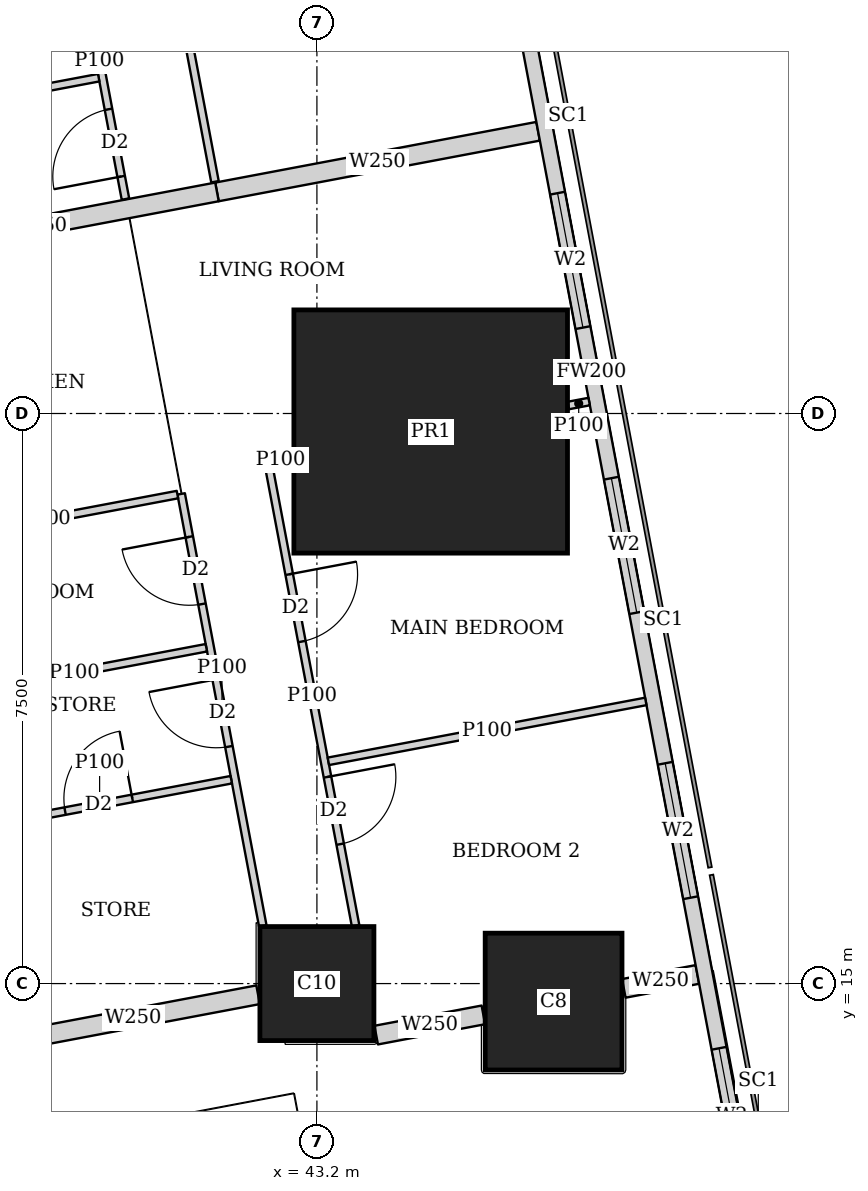
"""IFC4 building model, lengths in metres.
Left out: names, types, materials, properties, quantities, classifications, styles, units other than length and angle.
Written with IfcOpenShell. Run it as: python <this file> out.ifc"""

import sys

from ifc_helpers import new_model, si_unit, direction, frame, frame_2d, origin, origin_2d, place, context, subcontext, project, spatial, rectangle, extrude, element, fill, save


model = new_model("IFC4")
c1 = context("Model", 3, precision=1e-05, world=origin(), true_north=direction((0.0, 1.0)))
c2 = subcontext(c1, "Body", "Model", "MODEL_VIEW")
j1 = project(units=[si_unit("LENGTHUNIT", "METRE"), si_unit("PLANEANGLEUNIT", "RADIAN")], contexts=[c1])
p1 = place(None, origin())
s1 = spatial("IfcSite", under=j1, at=p1, CompositionType="ELEMENT")
p2 = place(p1, origin())
s2 = spatial("IfcBuilding", under=s1, at=p2, CompositionType="ELEMENT")
p3 = place(p2, frame((0.0, 0.0, 184.55)))
s3 = spatial("IfcBuildingStorey", under=s2, at=p3, CompositionType="ELEMENT", Elevation=184.55)
p4 = place(p3, frame((43.2, 15.0, 0.0), z_axis=(0.0, 0.0, 1.0), x_axis=(1.0, 0.0, 0.0)))
e1 = element("IfcColumn", 1, at=p4, inside=s3, PredefinedType="COLUMN", context=c2, shape_type="SweptSolid", body=[
    extrude(rectangle(XDim=1.5, YDim=1.5, at=origin_2d()), origin(), (0.0, 0.0, 1.0), 3.75),
])
p5 = place(p3, frame((46.314, 14.763, 0.0), z_axis=(0.0, 0.0, 1.0), x_axis=(1.0, 0.0, 0.0)))
e2 = element("IfcColumn", 2, at=p5, inside=s3, PredefinedType="COLUMN", context=c2, shape_type="SweptSolid", body=[
    extrude(rectangle(XDim=1.8, YDim=1.8, at=origin_2d()), origin(), (0.0, 0.0, 1.0), 3.75),
])
p6 = place(p3, frame((44.697, 22.263, 0.0), z_axis=(0.0, 0.0, 1.0), x_axis=(1.0, 0.0, 0.0)))
e3 = element("IfcColumn", 3, at=p6, inside=s3, PredefinedType="COLUMN", context=c2, shape_type="SweptSolid", body=[
    extrude(rectangle(XDim=3.6, YDim=3.2, at=origin_2d()), origin(), (0.0, 0.0, 1.0), 3.75),
])
p7 = place(p3, frame((50.653, 2.703, 0.0), z_axis=(0.0, 0.0, 1.0), x_axis=(-0.185612026696, 0.982623109613, 0.0)))
e4 = element("IfcWall", 4, at=p7, inside=s3, PredefinedType="SOLIDWALL", context=c2, shape_type="SweptSolid", body=[
    extrude(rectangle(XDim=41.393, YDim=0.2, at=frame_2d((20.697, 0.0))), origin(), (0.0, 0.0, 1.0), 3.45),
])
p8 = place(p7, frame((1.633, 0.0, 0.9)))
e5 = element("IfcOpeningElement", 5, at=p8, cuts=e4, PredefinedType="OPENING", context=c2, shape_type="SweptSolid", body=[
    extrude(rectangle(XDim=1.8, YDim=1.5, at=frame_2d((0.9, 0.75))), frame((0.0, 0.11, 0.0), z_axis=(0.0, -1.0, 0.0), x_axis=(1.0, 0.0, 0.0)), (0.0, 0.0, 1.0), 0.22),
])
p9 = place(p7, frame((6.032, 0.0, 0.9)))
e6 = element("IfcOpeningElement", 6, at=p9, cuts=e4, PredefinedType="OPENING", context=c2, shape_type="SweptSolid", body=[
    extrude(rectangle(XDim=1.8, YDim=1.5, at=frame_2d((0.9, 0.75))), frame((0.0, 0.11, 0.0), z_axis=(0.0, -1.0, 0.0), x_axis=(1.0, 0.0, 0.0)), (0.0, 0.0, 1.0), 0.22),
])
p10 = place(p7, frame((9.848, 0.0, 0.9)))
e7 = element("IfcOpeningElement", 7, at=p10, cuts=e4, PredefinedType="OPENING", context=c2, shape_type="SweptSolid", body=[
    extrude(rectangle(XDim=1.8, YDim=1.5, at=frame_2d((0.9, 0.75))), frame((0.0, 0.11, 0.0), z_axis=(0.0, -1.0, 0.0), x_axis=(1.0, 0.0, 0.0)), (0.0, 0.0, 1.0), 0.22),
])
p11 = place(p7, frame((13.664, 0.0, 0.9)))
e8 = element("IfcOpeningElement", 8, at=p11, cuts=e4, PredefinedType="OPENING", context=c2, shape_type="SweptSolid", body=[
    extrude(rectangle(XDim=1.8, YDim=1.5, at=frame_2d((0.9, 0.75))), frame((0.0, 0.11, 0.0), z_axis=(0.0, -1.0, 0.0), x_axis=(1.0, 0.0, 0.0)), (0.0, 0.0, 1.0), 0.22),
])
p12 = place(p7, frame((17.481, 0.0, 0.9)))
e9 = element("IfcOpeningElement", 9, at=p12, cuts=e4, PredefinedType="OPENING", context=c2, shape_type="SweptSolid", body=[
    extrude(rectangle(XDim=1.8, YDim=1.5, at=frame_2d((0.9, 0.75))), frame((0.0, 0.11, 0.0), z_axis=(0.0, -1.0, 0.0), x_axis=(1.0, 0.0, 0.0)), (0.0, 0.0, 1.0), 0.22),
])
p13 = place(p7, frame((21.297, 0.0, 0.9)))
e10 = element("IfcOpeningElement", 10, at=p13, cuts=e4, PredefinedType="OPENING", context=c2, shape_type="SweptSolid", body=[
    extrude(rectangle(XDim=1.8, YDim=1.5, at=frame_2d((0.9, 0.75))), frame((0.0, 0.11, 0.0), z_axis=(0.0, -1.0, 0.0), x_axis=(1.0, 0.0, 0.0)), (0.0, 0.0, 1.0), 0.22),
])
p14 = place(p7, frame((25.113, 0.0, 0.9)))
e11 = element("IfcOpeningElement", 11, at=p14, cuts=e4, PredefinedType="OPENING", context=c2, shape_type="SweptSolid", body=[
    extrude(rectangle(XDim=1.8, YDim=1.5, at=frame_2d((0.9, 0.75))), frame((0.0, 0.11, 0.0), z_axis=(0.0, -1.0, 0.0), x_axis=(1.0, 0.0, 0.0)), (0.0, 0.0, 1.0), 0.22),
])
p15 = place(p7, frame((28.93, 0.0, 0.9)))
e12 = element("IfcOpeningElement", 12, at=p15, cuts=e4, PredefinedType="OPENING", context=c2, shape_type="SweptSolid", body=[
    extrude(rectangle(XDim=1.8, YDim=1.5, at=frame_2d((0.9, 0.75))), frame((0.0, 0.11, 0.0), z_axis=(0.0, -1.0, 0.0), x_axis=(1.0, 0.0, 0.0)), (0.0, 0.0, 1.0), 0.22),
])
p16 = place(p7, frame((32.746, 0.0, 0.9)))
e13 = element("IfcOpeningElement", 13, at=p16, cuts=e4, PredefinedType="OPENING", context=c2, shape_type="SweptSolid", body=[
    extrude(rectangle(XDim=1.8, YDim=1.5, at=frame_2d((0.9, 0.75))), frame((0.0, 0.11, 0.0), z_axis=(0.0, -1.0, 0.0), x_axis=(1.0, 0.0, 0.0)), (0.0, 0.0, 1.0), 0.22),
])
p17 = place(p7, frame((36.481, 0.0, 0.9)))
e14 = element("IfcOpeningElement", 14, at=p17, cuts=e4, PredefinedType="OPENING", context=c2, shape_type="SweptSolid", body=[
    extrude(rectangle(XDim=1.8, YDim=1.5, at=frame_2d((0.9, 0.75))), frame((0.0, 0.11, 0.0), z_axis=(0.0, -1.0, 0.0), x_axis=(1.0, 0.0, 0.0)), (0.0, 0.0, 1.0), 0.22),
])
p18 = place(p3, frame((33.623, 43.022, 0.0), z_axis=(0.0, 0.0, 1.0), x_axis=(0.185596841028, -0.98262597798, 0.0)))
e15 = element("IfcWall", 15, at=p18, inside=s3, PredefinedType="SOLIDWALL", context=c2, shape_type="SweptSolid", body=[
    extrude(rectangle(XDim=41.66, YDim=0.15, at=frame_2d((20.83, 0.0))), origin(), (0.0, 0.0, 1.0), 2.45),
])
p19 = place(p18, frame((8.034, 0.0, 0.0)))
e16 = element("IfcOpeningElement", 16, at=p19, cuts=e15, PredefinedType="OPENING", context=c2, shape_type="SweptSolid", body=[
    extrude(rectangle(XDim=1.0, YDim=2.1, at=frame_2d((0.5, 1.05))), frame((0.0, 0.085, 0.0), z_axis=(0.0, -1.0, 0.0), x_axis=(1.0, 0.0, 0.0)), (0.0, 0.0, 1.0), 0.17),
])
p20 = place(p18, frame((12.611, 0.0, 0.0)))
e17 = element("IfcOpeningElement", 17, at=p20, cuts=e15, PredefinedType="OPENING", context=c2, shape_type="SweptSolid", body=[
    extrude(rectangle(XDim=1.0, YDim=2.1, at=frame_2d((0.5, 1.05))), frame((0.0, 0.085, 0.0), z_axis=(0.0, -1.0, 0.0), x_axis=(1.0, 0.0, 0.0)), (0.0, 0.0, 1.0), 0.17),
])
p21 = place(p18, frame((20.242, 0.0, 0.0)))
e18 = element("IfcOpeningElement", 18, at=p21, cuts=e15, PredefinedType="OPENING", context=c2, shape_type="SweptSolid", body=[
    extrude(rectangle(XDim=1.0, YDim=2.1, at=frame_2d((0.5, 1.05))), frame((0.0, 0.085, 0.0), z_axis=(0.0, -1.0, 0.0), x_axis=(1.0, 0.0, 0.0)), (0.0, 0.0, 1.0), 0.17),
])
p22 = place(p18, frame((31.206, 0.0, 0.0)))
e19 = element("IfcOpeningElement", 19, at=p22, cuts=e15, PredefinedType="OPENING", context=c2, shape_type="SweptSolid", body=[
    extrude(rectangle(XDim=1.0, YDim=2.1, at=frame_2d((0.5, 1.05))), frame((0.0, 0.085, 0.0), z_axis=(0.0, -1.0, 0.0), x_axis=(1.0, 0.0, 0.0)), (0.0, 0.0, 1.0), 0.17),
])
p23 = place(p3, frame((41.156, 29.273, 0.0), z_axis=(0.0, 0.0, 1.0), x_axis=(0.185474762472, -0.982649028131, 0.0)))
e20 = element("IfcWall", 20, at=p23, inside=s3, PredefinedType="PARTITIONING", context=c2, shape_type="SweptSolid", body=[
    extrude(rectangle(XDim=3.79, YDim=0.1, at=frame_2d((1.895, 0.0))), origin(), (0.0, 0.0, 1.0), 2.45),
])
p24 = place(p23, frame((0.31, 0.0, 0.0)))
e21 = element("IfcOpeningElement", 21, at=p24, cuts=e20, PredefinedType="OPENING", context=c2, shape_type="SweptSolid", body=[
    extrude(rectangle(XDim=0.9, YDim=2.1, at=frame_2d((0.45, 1.05))), frame((0.0, 0.06, 0.0), z_axis=(0.0, -1.0, 0.0), x_axis=(1.0, 0.0, 0.0)), (0.0, 0.0, 1.0), 0.12),
])
p25 = place(p3, frame((39.997, 28.942, 0.0), z_axis=(0.0, 0.0, 1.0), x_axis=(0.185580474845, -0.982629069057, 0.0)))
e22 = element("IfcWall", 22, at=p25, inside=s3, PredefinedType="PARTITIONING", context=c2, shape_type="SweptSolid", body=[
    extrude(rectangle(XDim=3.685, YDim=0.1, at=frame_2d((1.842, 0.0))), origin(), (0.0, 0.0, 1.0), 3.45),
])
p26 = place(p25, frame((0.576, 0.0, 0.0)))
e23 = element("IfcOpeningElement", 23, at=p26, cuts=e22, PredefinedType="OPENING", context=c2, shape_type="SweptSolid", body=[
    extrude(rectangle(XDim=0.9, YDim=2.1, at=frame_2d((0.45, 1.05))), frame((0.0, 0.06, 0.0), z_axis=(0.0, -1.0, 0.0), x_axis=(1.0, 0.0, 0.0)), (0.0, 0.0, 1.0), 0.12),
])
p27 = place(p25, frame((2.483, 0.0, 0.0)))
e24 = element("IfcOpeningElement", 24, at=p27, cuts=e22, PredefinedType="OPENING", context=c2, shape_type="SweptSolid", body=[
    extrude(rectangle(XDim=0.9, YDim=2.1, at=frame_2d((0.45, 1.05))), frame((0.0, 0.06, 0.0), z_axis=(0.0, -1.0, 0.0), x_axis=(1.0, 0.0, 0.0)), (0.0, 0.0, 1.0), 0.12),
])
p28 = place(p3, frame((40.329, 26.918, 0.0), z_axis=(0.0, 0.0, 1.0), x_axis=(-0.982638553676, -0.185530247748, 0.0)))
e25 = element("IfcWall", 25, at=p28, inside=s3, PredefinedType="PARTITIONING", context=c2, shape_type="SweptSolid", body=[
    extrude(rectangle(XDim=3.525, YDim=0.1, at=frame_2d((1.763, 0.0))), origin(), (0.0, 0.0, 1.0), 3.45),
])
p29 = place(p3, frame((42.566, 21.809, 0.0), z_axis=(0.0, 0.0, 1.0), x_axis=(0.185679528947, -0.982610356413, 0.0)))
e26 = element("IfcWall", 26, at=p29, inside=s3, PredefinedType="PARTITIONING", context=c2, shape_type="SweptSolid", body=[
    extrude(rectangle(XDim=6.156, YDim=0.1, at=frame_2d((3.078, 0.0))), origin(), (0.0, 0.0, 1.0), 2.45),
])
p30 = place(p29, frame((1.45, 0.0, 0.0)))
e27 = element("IfcOpeningElement", 27, at=p30, cuts=e26, PredefinedType="OPENING", context=c2, shape_type="SweptSolid", body=[
    extrude(rectangle(XDim=0.9, YDim=2.1, at=frame_2d((0.45, 1.05))), frame((0.0, 0.06, 0.0), z_axis=(0.0, -1.0, 0.0), x_axis=(1.0, 0.0, 0.0)), (0.0, 0.0, 1.0), 0.12),
])
p31 = place(p29, frame((4.163, 0.0, 0.0)))
e28 = element("IfcOpeningElement", 28, at=p31, cuts=e26, PredefinedType="OPENING", context=c2, shape_type="SweptSolid", body=[
    extrude(rectangle(XDim=0.9, YDim=2.1, at=frame_2d((0.45, 1.05))), frame((0.0, 0.06, 0.0), z_axis=(0.0, -1.0, 0.0), x_axis=(1.0, 0.0, 0.0)), (0.0, 0.0, 1.0), 0.12),
])
p32 = place(p3, frame((41.414, 21.442, 0.0), z_axis=(0.0, 0.0, 1.0), x_axis=(0.185666997732, -0.982612724299, 0.0)))
e29 = element("IfcWall", 29, at=p32, inside=s3, PredefinedType="PARTITIONING", context=c2, shape_type="SweptSolid", body=[
    extrude(rectangle(XDim=5.784, YDim=0.1, at=frame_2d((2.892, 0.0))), origin(), (0.0, 0.0, 1.0), 3.45),
])
p33 = place(p32, frame((0.575, 0.0, 0.0)))
e30 = element("IfcOpeningElement", 30, at=p33, cuts=e29, PredefinedType="OPENING", context=c2, shape_type="SweptSolid", body=[
    extrude(rectangle(XDim=0.9, YDim=2.1, at=frame_2d((0.45, 1.05))), frame((0.0, 0.06, 0.0), z_axis=(0.0, -1.0, 0.0), x_axis=(1.0, 0.0, 0.0)), (0.0, 0.0, 1.0), 0.12),
])
p34 = place(p32, frame((2.483, 0.0, 0.0)))
e31 = element("IfcOpeningElement", 31, at=p34, cuts=e29, PredefinedType="OPENING", context=c2, shape_type="SweptSolid", body=[
    extrude(rectangle(XDim=0.9, YDim=2.1, at=frame_2d((0.45, 1.05))), frame((0.0, 0.06, 0.0), z_axis=(0.0, -1.0, 0.0), x_axis=(1.0, 0.0, 0.0)), (0.0, 0.0, 1.0), 0.12),
])
p35 = place(p3, frame((46.782, 22.657, 0.0), z_axis=(0.0, 0.0, 1.0), x_axis=(-0.982574553168, -0.185868898601, 0.0)))
e32 = element("IfcWall", 32, at=p35, inside=s3, PredefinedType="PARTITIONING", context=c2, shape_type="SweptSolid", body=[
    extrude(rectangle(XDim=0.28, YDim=0.1, at=frame_2d((0.14, 0.0))), origin(), (0.0, 0.0, 1.0), 3.45),
])
p36 = place(p3, frame((42.887, 21.921, 0.0), z_axis=(0.0, 0.0, 1.0), x_axis=(-0.982274918032, -0.187445953293, 0.0)))
e33 = element("IfcWall", 33, at=p36, inside=s3, PredefinedType="PARTITIONING", context=c2, shape_type="SweptSolid", body=[
    extrude(rectangle(XDim=0.336, YDim=0.1, at=frame_2d((0.168, 0.0))), origin(), (0.0, 0.0, 1.0), 2.45),
])
p37 = place(p3, frame((47.527, 18.712, 0.0), z_axis=(0.0, 0.0, 1.0), x_axis=(-0.982665405803, -0.185387972203, 0.0)))
e34 = element("IfcWall", 34, at=p37, inside=s3, PredefinedType="PARTITIONING", context=c2, shape_type="SweptSolid", body=[
    extrude(rectangle(XDim=4.25, YDim=0.1, at=frame_2d((2.125, 0.0))), origin(), (0.0, 0.0, 1.0), 2.05),
])
p38 = place(p3, frame((41.365, 21.433, 0.0), z_axis=(0.0, 0.0, 1.0), x_axis=(-0.982638553676, -0.185530247748, 0.0)))
e35 = element("IfcWall", 35, at=p38, inside=s3, PredefinedType="PARTITIONING", context=c2, shape_type="SweptSolid", body=[
    extrude(rectangle(XDim=3.525, YDim=0.1, at=frame_2d((1.763, 0.0))), origin(), (0.0, 0.0, 1.0), 3.45),
])
p39 = place(p3, frame((42.073, 17.682, 0.0), z_axis=(0.0, 0.0, 1.0), x_axis=(-0.98265117712, -0.185463376723, 0.0)))
e36 = element("IfcWall", 36, at=p39, inside=s3, PredefinedType="PARTITIONING", context=c2, shape_type="SweptSolid", body=[
    extrude(rectangle(XDim=3.525, YDim=0.1, at=frame_2d((1.763, 0.0))), origin(), (0.0, 0.0, 1.0), 3.45),
])
p40 = place(p39, frame((1.325, 0.0, 0.0)))
e37 = element("IfcOpeningElement", 37, at=p40, cuts=e36, PredefinedType="OPENING", context=c2, shape_type="SweptSolid", body=[
    extrude(rectangle(XDim=0.9, YDim=2.1, at=frame_2d((0.45, 1.05))), frame((0.0, 0.06, 0.0), z_axis=(0.0, -1.0, 0.0), x_axis=(1.0, 0.0, 0.0)), (0.0, 0.0, 1.0), 0.12),
])
p41 = place(p3, frame((41.745, 19.418, 0.0), z_axis=(0.0, 0.0, 1.0), x_axis=(-0.982638553676, -0.185530247748, 0.0)))
e38 = element("IfcWall", 38, at=p41, inside=s3, PredefinedType="PARTITIONING", context=c2, shape_type="SweptSolid", body=[
    extrude(rectangle(XDim=3.525, YDim=0.1, at=frame_2d((1.763, 0.0))), origin(), (0.0, 0.0, 1.0), 3.45),
])
p42 = place(p3, frame((46.11, 26.213, 0.0), z_axis=(0.0, 0.0, 1.0), x_axis=(-0.982633535512, -0.185556823879, 0.0)))
e39 = element("IfcWall", 39, at=p42, inside=s3, PredefinedType="SOLIDWALL", context=c2, shape_type="SweptSolid", body=[
    extrude(rectangle(XDim=4.3, YDim=0.25, at=frame_2d((2.15, 0.0))), origin(), (0.0, 0.0, 1.0), 2.05),
])
p43 = place(p3, frame((41.885, 25.415, 0.0), z_axis=(0.0, 0.0, 1.0), x_axis=(-0.982596737686, -0.185751584349, 0.0)))
e40 = element("IfcWall", 40, at=p43, inside=s3, PredefinedType="SOLIDWALL", context=c2, shape_type="SweptSolid", body=[
    extrude(rectangle(XDim=4.775, YDim=0.25, at=frame_2d((2.387, 0.0))), origin(), (0.0, 0.0, 1.0), 3.45),
])
p44 = place(p3, frame((48.206, 15.12, 0.0), z_axis=(0.0, 0.0, 1.0), x_axis=(-0.982576361834, -0.185859337043, 0.0)))
e41 = element("IfcWall", 41, at=p44, inside=s3, PredefinedType="SOLIDWALL", context=c2, shape_type="SweptSolid", body=[
    extrude(rectangle(XDim=0.985, YDim=0.25, at=frame_2d((0.493, 0.0))), origin(), (0.0, 0.0, 1.0), 2.05),
])
p45 = place(p3, frame((45.39, 14.588, 0.0), z_axis=(0.0, 0.0, 1.0), x_axis=(-0.982680951688, -0.18530555089, 0.0)))
e42 = element("IfcWall", 42, at=p45, inside=s3, PredefinedType="SOLIDWALL", context=c2, shape_type="SweptSolid", body=[
    extrude(rectangle(XDim=1.435, YDim=0.25, at=frame_2d((0.717, 0.0))), origin(), (0.0, 0.0, 1.0), 2.05),
])
p46 = place(p3, frame((42.426, 14.853, 0.0), z_axis=(0.0, 0.0, 1.0), x_axis=(-0.982633560103, -0.185556693654, 0.0)))
e43 = element("IfcWall", 43, at=p46, inside=s3, PredefinedType="SOLIDWALL", context=c2, shape_type="SweptSolid", body=[
    extrude(rectangle(XDim=3.347, YDim=0.25, at=frame_2d((1.674, 0.0))), origin(), (0.0, 0.0, 1.0), 3.45),
])
p47 = place(p10, origin())
e44 = element("IfcWindow", 44, at=p47, inside=s3, PartitioningType="SINGLE_PANEL", PredefinedType="WINDOW", context=c2, shape_type="SweptSolid", body=[
    extrude(rectangle(XDim=1.8, YDim=1.5, at=frame_2d((0.9, 0.75))), frame((0.0, 0.03, 0.0), z_axis=(0.0, -1.0, 0.0), x_axis=(1.0, 0.0, 0.0)), (0.0, 0.0, 1.0), 0.06),
])
fill(e7, e44)
p48 = place(p11, origin())
e45 = element("IfcWindow", 45, at=p48, inside=s3, PartitioningType="SINGLE_PANEL", PredefinedType="WINDOW", context=c2, shape_type="SweptSolid", body=[
    extrude(rectangle(XDim=1.8, YDim=1.5, at=frame_2d((0.9, 0.75))), frame((0.0, 0.03, 0.0), z_axis=(0.0, -1.0, 0.0), x_axis=(1.0, 0.0, 0.0)), (0.0, 0.0, 1.0), 0.06),
])
fill(e8, e45)
p49 = place(p12, origin())
e46 = element("IfcWindow", 46, at=p49, inside=s3, PartitioningType="SINGLE_PANEL", PredefinedType="WINDOW", context=c2, shape_type="SweptSolid", body=[
    extrude(rectangle(XDim=1.8, YDim=1.5, at=frame_2d((0.9, 0.75))), frame((0.0, 0.03, 0.0), z_axis=(0.0, -1.0, 0.0), x_axis=(1.0, 0.0, 0.0)), (0.0, 0.0, 1.0), 0.06),
])
fill(e9, e46)
p50 = place(p13, origin())
e47 = element("IfcWindow", 47, at=p50, inside=s3, PartitioningType="SINGLE_PANEL", PredefinedType="WINDOW", context=c2, shape_type="SweptSolid", body=[
    extrude(rectangle(XDim=1.8, YDim=1.5, at=frame_2d((0.9, 0.75))), frame((0.0, 0.03, 0.0), z_axis=(0.0, -1.0, 0.0), x_axis=(1.0, 0.0, 0.0)), (0.0, 0.0, 1.0), 0.06),
])
fill(e10, e47)
p51 = place(p27, origin())
e48 = element("IfcDoor", 48, at=p51, inside=s3, OperationType="SINGLE_SWING_LEFT", PredefinedType="DOOR", context=c2, shape_type="SweptSolid", body=[
    extrude(rectangle(XDim=0.9, YDim=2.1, at=frame_2d((0.45, 1.05))), frame((0.0, 0.025, 0.0), z_axis=(0.0, -1.0, 0.0), x_axis=(1.0, 0.0, 0.0)), (0.0, 0.0, 1.0), 0.05),
])
fill(e24, e48)
p52 = place(p30, origin())
e49 = element("IfcDoor", 49, at=p52, inside=s3, OperationType="SINGLE_SWING_LEFT", PredefinedType="DOOR", context=c2, shape_type="SweptSolid", body=[
    extrude(rectangle(XDim=0.9, YDim=2.1, at=frame_2d((0.45, 1.05))), frame((0.0, 0.025, 0.0), z_axis=(0.0, -1.0, 0.0), x_axis=(1.0, 0.0, 0.0)), (0.0, 0.0, 1.0), 0.05),
])
fill(e27, e49)
p53 = place(p31, origin())
e50 = element("IfcDoor", 50, at=p53, inside=s3, OperationType="SINGLE_SWING_LEFT", PredefinedType="DOOR", context=c2, shape_type="SweptSolid", body=[
    extrude(rectangle(XDim=0.9, YDim=2.1, at=frame_2d((0.45, 1.05))), frame((0.0, 0.025, 0.0), z_axis=(0.0, -1.0, 0.0), x_axis=(1.0, 0.0, 0.0)), (0.0, 0.0, 1.0), 0.05),
])
fill(e28, e50)
p54 = place(p33, origin())
e51 = element("IfcDoor", 51, at=p54, inside=s3, OperationType="SINGLE_SWING_RIGHT", PredefinedType="DOOR", context=c2, shape_type="SweptSolid", body=[
    extrude(rectangle(XDim=0.9, YDim=2.1, at=frame_2d((0.45, 1.05))), frame((0.0, 0.025, 0.0), z_axis=(0.0, -1.0, 0.0), x_axis=(1.0, 0.0, 0.0)), (0.0, 0.0, 1.0), 0.05),
])
fill(e30, e51)
p55 = place(p34, origin())
e52 = element("IfcDoor", 52, at=p55, inside=s3, OperationType="SINGLE_SWING_RIGHT", PredefinedType="DOOR", context=c2, shape_type="SweptSolid", body=[
    extrude(rectangle(XDim=0.9, YDim=2.1, at=frame_2d((0.45, 1.05))), frame((0.0, 0.025, 0.0), z_axis=(0.0, -1.0, 0.0), x_axis=(1.0, 0.0, 0.0)), (0.0, 0.0, 1.0), 0.05),
])
fill(e31, e52)
p56 = place(p40, origin())
e53 = element("IfcDoor", 53, at=p56, inside=s3, OperationType="SINGLE_SWING_RIGHT", PredefinedType="DOOR", context=c2, shape_type="SweptSolid", body=[
    extrude(rectangle(XDim=0.9, YDim=2.1, at=frame_2d((0.45, 1.05))), frame((0.0, 0.025, 0.0), z_axis=(0.0, -1.0, 0.0), x_axis=(1.0, 0.0, 0.0)), (0.0, 0.0, 1.0), 0.05),
])
fill(e37, e53)
save(model, sys.argv[1])
